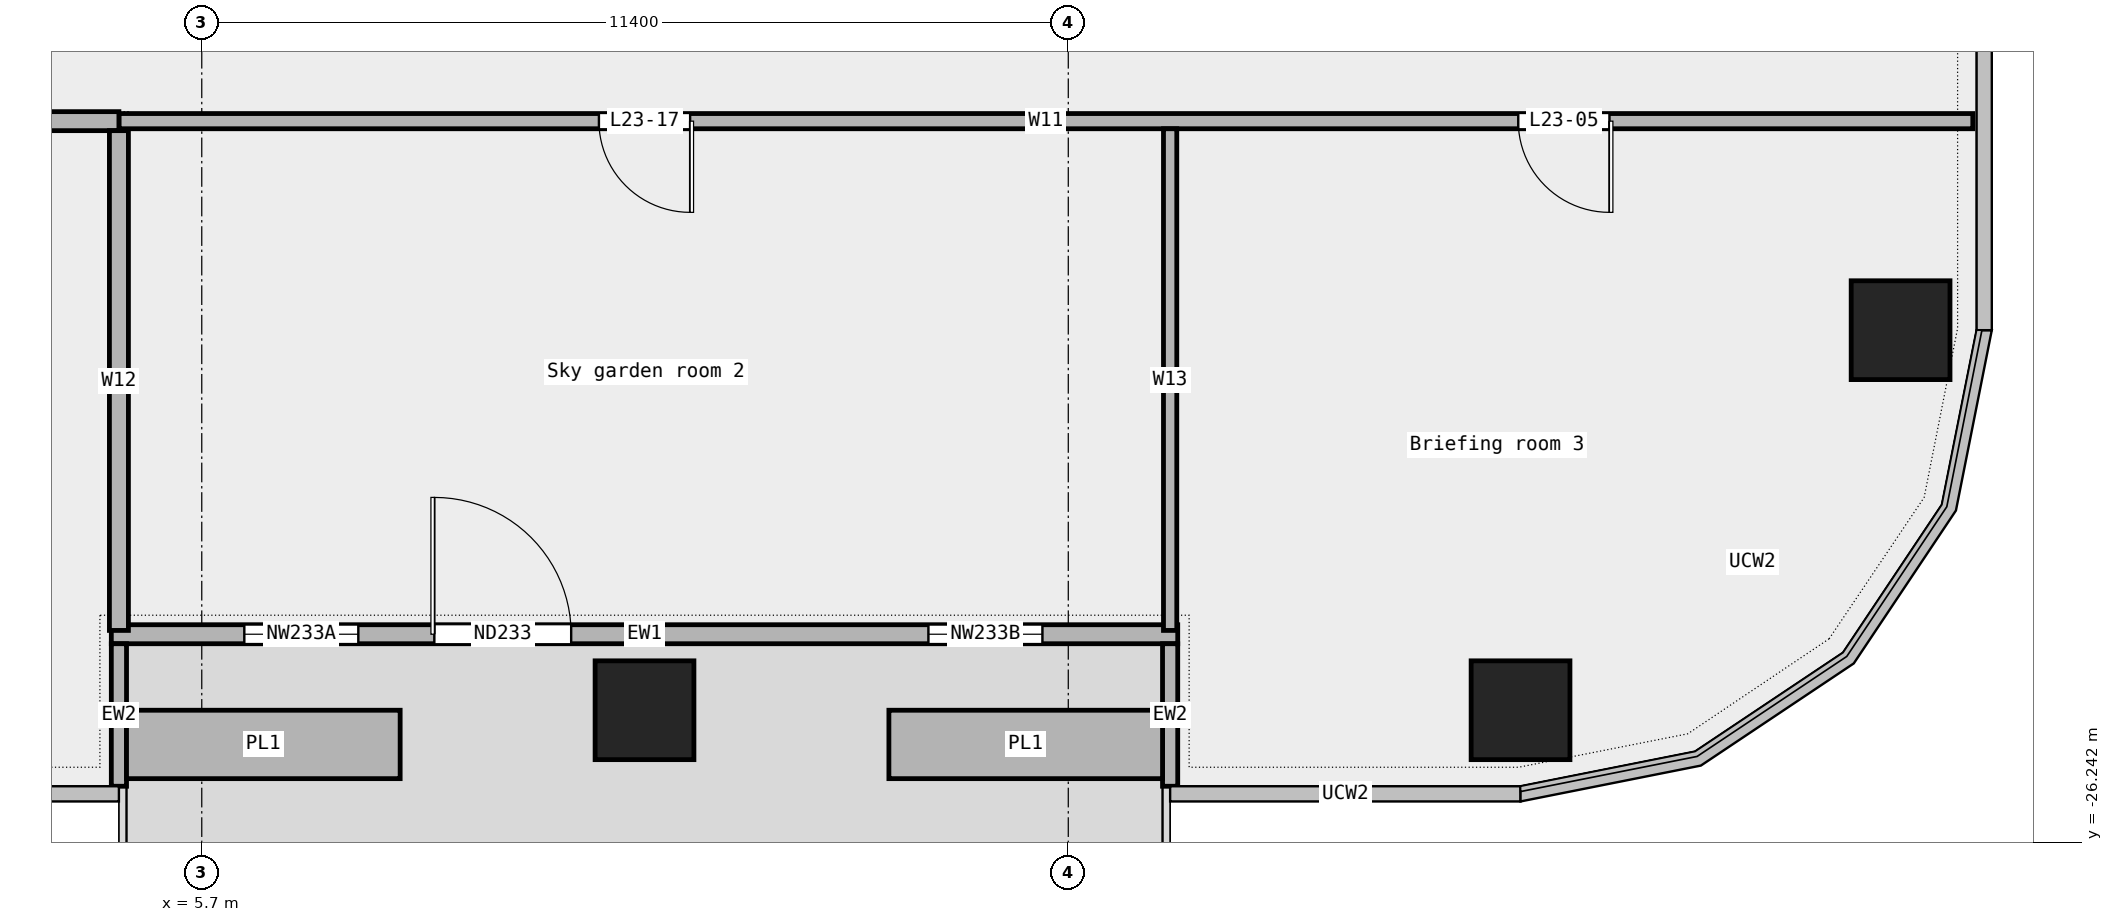
"""IFC4 building model, lengths in metres.
Left out: names, types, materials, properties, quantities, classifications, styles, units other than length and angle.
Written with IfcOpenShell. Run it as: python <this file> out.ifc"""

import sys

from ifc_helpers import new_model, si_unit, direction, frame, frame_2d, origin, origin_2d, place, context, subcontext, project, spatial, rectangle, extrude, element, fill, save


model = new_model("IFC4")
c1 = context("Model", 3, precision=1e-05, world=origin(), true_north=direction((0.0, 1.0)))
c2 = subcontext(c1, "Body", "Model", "MODEL_VIEW")
j1 = project(units=[si_unit("LENGTHUNIT", "METRE"), si_unit("PLANEANGLEUNIT", "RADIAN")], contexts=[c1])
p1 = place(None, origin())
s1 = spatial("IfcSite", under=j1, at=p1, CompositionType="ELEMENT")
p2 = place(p1, origin())
s2 = spatial("IfcBuilding", under=s1, at=p2, CompositionType="ELEMENT")
p3 = place(p2, frame((0.0, 0.0, 117.1)))
s3 = spatial("IfcBuildingStorey", under=s2, at=p3, CompositionType="ELEMENT", Elevation=117.1)
for number, where, z_axis, x_axis in (
    (1, (11.525, -24.5, 0.0), (0.0, 0.0, 1.0), (1.0, 0.0, 0.0)),
    (2, (23.05, -24.5, 0.0), (0.0, 0.0, 1.0), (1.0, 0.0, 0.0)),
    (3, (28.05, -19.5, 0.0), (0.0, 0.0, 1.0), (1.0, 0.0, 0.0)),
):
    element("IfcColumn", number, at=place(p3, frame(where, z_axis=z_axis, x_axis=x_axis)), inside=s3, PredefinedType="COLUMN", context=c2, shape_type="SweptSolid", body=[
        extrude(rectangle(XDim=1.3, YDim=1.3, at=origin_2d()), origin(), (0.0, 0.0, 1.0), 4.05),
    ])
p4 = place(p3, frame((4.51, -23.5, 0.0), z_axis=(0.0, 0.0, 1.0), x_axis=(1.0, 0.0, 0.0)))
e4 = element("IfcWall", 4, at=p4, inside=s3, PredefinedType="STANDARD", context=c2, shape_type="SweptSolid", body=[
    extrude(rectangle(XDim=14.03, YDim=0.25, at=frame_2d((7.015, 0.0))), origin(), (0.0, 0.0, 1.0), 4.05),
])
p5 = place(p4, frame((1.75, 0.0, 0.45)))
e5 = element("IfcOpeningElement", 5, at=p5, cuts=e4, PredefinedType="OPENING", context=c2, shape_type="SweptSolid", body=[
    extrude(rectangle(XDim=1.5, YDim=3.0, at=frame_2d((0.75, 1.5))), frame((0.0, 0.137, 0.0), z_axis=(0.0, -1.0, 0.0), x_axis=(1.0, 0.0, 0.0)), (0.0, 0.0, 1.0), 0.274),
])
p6 = place(p4, frame((4.25, 0.0, 0.0)))
e6 = element("IfcOpeningElement", 6, at=p6, cuts=e4, PredefinedType="OPENING", context=c2, shape_type="SweptSolid", body=[
    extrude(rectangle(XDim=1.8, YDim=2.4, at=frame_2d((0.9, 1.2))), frame((0.0, 0.137, 0.0), z_axis=(0.0, -1.0, 0.0), x_axis=(1.0, 0.0, 0.0)), (0.0, 0.0, 1.0), 0.274),
])
p7 = place(p4, frame((10.75, 0.0, 0.45)))
e7 = element("IfcOpeningElement", 7, at=p7, cuts=e4, PredefinedType="OPENING", context=c2, shape_type="SweptSolid", body=[
    extrude(rectangle(XDim=1.5, YDim=3.0, at=frame_2d((0.75, 1.5))), frame((0.0, 0.137, 0.0), z_axis=(0.0, -1.0, 0.0), x_axis=(1.0, 0.0, 0.0)), (0.0, 0.0, 1.0), 0.274),
])
for number, where, z_axis, x_axis in (
    (8, (4.61, -25.5, 0.0), (0.0, 0.0, 1.0), (0.0, 1.0, 0.0)),
    (9, (18.44, -25.5, 0.0), (0.0, 0.0, 1.0), (0.0, 1.0, 0.0)),
):
    element("IfcWall", number, at=place(p3, frame(where, z_axis=z_axis, x_axis=x_axis)), inside=s3, PredefinedType="STANDARD", context=c2, shape_type="SweptSolid", body=[
        extrude(rectangle(XDim=1.875, YDim=0.2, at=frame_2d((0.938, 0.0))), origin(), (0.0, 0.0, 1.0), 4.05),
    ])
for number, where, z_axis, x_axis in (
    (10, (4.71, -24.95, 0.0), (0.0, 0.0, 1.0), (1.0, 0.0, 0.0)),
    (11, (14.74, -24.95, 0.0), (0.0, 0.0, 1.0), (1.0, 0.0, 0.0)),
):
    element("IfcWall", number, at=place(p3, frame(where, z_axis=z_axis, x_axis=x_axis)), inside=s3, PredefinedType="STANDARD", context=c2, shape_type="SweptSolid", body=[
        extrude(rectangle(XDim=3.6, YDim=0.9, at=frame_2d((1.8, 0.0))), origin(), (0.0, 0.0, 1.0), 0.7),
    ])
p8 = place(p3, frame((4.61, -16.75, 0.0), z_axis=(0.0, 0.0, 1.0), x_axis=(1.0, 0.0, 0.0)))
e12 = element("IfcWall", 12, at=p8, inside=s3, PredefinedType="PARTITIONING", context=c2, shape_type="SweptSolid", body=[
    extrude(rectangle(XDim=24.39, YDim=0.2, at=frame_2d((12.195, 0.0))), origin(), (0.0, 0.0, 1.0), 4.05),
])
p9 = place(p8, frame((18.41, 0.0, 0.0)))
e13 = element("IfcOpeningElement", 13, at=p9, cuts=e12, PredefinedType="OPENING", context=c2, shape_type="SweptSolid", body=[
    extrude(rectangle(XDim=1.2, YDim=2.1, at=frame_2d((0.6, 1.05))), frame((0.0, 0.112, 0.0), z_axis=(0.0, -1.0, 0.0), x_axis=(1.0, 0.0, 0.0)), (0.0, 0.0, 1.0), 0.224),
])
p10 = place(p8, frame((6.315, 0.0, 0.0)))
e14 = element("IfcOpeningElement", 14, at=p10, cuts=e12, PredefinedType="OPENING", context=c2, shape_type="SweptSolid", body=[
    extrude(rectangle(XDim=1.2, YDim=2.1, at=frame_2d((0.6, 1.05))), frame((0.0, 0.112, 0.0), z_axis=(0.0, -1.0, 0.0), x_axis=(1.0, 0.0, 0.0)), (0.0, 0.0, 1.0), 0.224),
])
p11 = place(p3, frame((-4.115, -16.75, 0.0), z_axis=(0.0, 0.0, 1.0), x_axis=(1.0, 0.0, 0.0)))
e15 = element("IfcWall", 15, at=p11, inside=s3, PredefinedType="PARTITIONING", context=c2, shape_type="SweptSolid", body=[
    extrude(rectangle(XDim=8.725, YDim=0.25, at=frame_2d((4.363, 0.0))), origin(), (0.0, 0.0, 1.0), 4.05),
])
p12 = place(p11, frame((3.462, 0.0, 0.0)))
e16 = element("IfcOpeningElement", 16, at=p12, cuts=e15, PredefinedType="OPENING", context=c2, shape_type="SweptSolid", body=[
    extrude(rectangle(XDim=1.8, YDim=2.1, at=frame_2d((0.9, 1.05))), frame((0.0, 0.137, 0.0), z_axis=(0.0, -1.0, 0.0), x_axis=(1.0, 0.0, 0.0)), (0.0, 0.0, 1.0), 0.274),
])
p13 = place(p3, frame((4.61, -23.45, 0.0), z_axis=(0.0, 0.0, 1.0), x_axis=(0.0, 1.0, 0.0)))
e17 = element("IfcWall", 17, at=p13, inside=s3, PredefinedType="PARTITIONING", context=c2, shape_type="SweptSolid", body=[
    extrude(rectangle(XDim=6.575, YDim=0.25, at=frame_2d((3.288, 0.0))), origin(), (0.0, 0.0, 1.0), 4.05),
])
p14 = place(p3, frame((18.44, -23.45, 0.0), z_axis=(0.0, 0.0, 1.0), x_axis=(0.0, 1.0, 0.0)))
e18 = element("IfcWall", 18, at=p14, inside=s3, PredefinedType="PARTITIONING", context=c2, shape_type="SweptSolid", body=[
    extrude(rectangle(XDim=6.6, YDim=0.175, at=frame_2d((3.3, 0.0))), origin(), (0.0, 0.0, 1.0), 4.05),
])
p15 = place(p5, origin())
e19 = element("IfcWindow", 19, at=p15, inside=s3, PartitioningType="SINGLE_PANEL", PredefinedType="WINDOW", context=c2, shape_type="SweptSolid", body=[
    extrude(rectangle(XDim=1.5, YDim=3.0, at=frame_2d((0.75, 1.5))), frame((0.0, 0.03, 0.0), z_axis=(0.0, -1.0, 0.0), x_axis=(1.0, 0.0, 0.0)), (0.0, 0.0, 1.0), 0.06),
])
fill(e5, e19)
p16 = place(p6, origin())
e20 = element("IfcDoor", 20, at=p16, inside=s3, OperationType="DOUBLE_DOOR_SINGLE_SWING", PredefinedType="DOOR", context=c2, shape_type="SweptSolid", body=[
    extrude(rectangle(XDim=1.8, YDim=2.4, at=frame_2d((0.9, 1.2))), frame((0.0, 0.025, 0.0), z_axis=(0.0, -1.0, 0.0), x_axis=(1.0, 0.0, 0.0)), (0.0, 0.0, 1.0), 0.05),
])
fill(e6, e20)
p17 = place(p7, origin())
e21 = element("IfcWindow", 21, at=p17, inside=s3, PartitioningType="SINGLE_PANEL", PredefinedType="WINDOW", context=c2, shape_type="SweptSolid", body=[
    extrude(rectangle(XDim=1.5, YDim=3.0, at=frame_2d((0.75, 1.5))), frame((0.0, 0.03, 0.0), z_axis=(0.0, -1.0, 0.0), x_axis=(1.0, 0.0, 0.0)), (0.0, 0.0, 1.0), 0.06),
])
fill(e7, e21)
p18 = place(p9, origin())
e22 = element("IfcDoor", 22, at=p18, inside=s3, OperationType="SINGLE_SWING_LEFT", PredefinedType="DOOR", context=c2, shape_type="SweptSolid", body=[
    extrude(rectangle(XDim=1.2, YDim=2.1, at=frame_2d((0.6, 1.05))), frame((0.0, 0.025, 0.0), z_axis=(0.0, -1.0, 0.0), x_axis=(1.0, 0.0, 0.0)), (0.0, 0.0, 1.0), 0.05),
])
fill(e13, e22)
p19 = place(p10, origin())
e23 = element("IfcDoor", 23, at=p19, inside=s3, OperationType="SINGLE_SWING_LEFT", PredefinedType="DOOR", context=c2, shape_type="SweptSolid", body=[
    extrude(rectangle(XDim=1.2, YDim=2.1, at=frame_2d((0.6, 1.05))), frame((0.0, 0.025, 0.0), z_axis=(0.0, -1.0, 0.0), x_axis=(1.0, 0.0, 0.0)), (0.0, 0.0, 1.0), 0.05),
])
fill(e14, e23)
save(model, sys.argv[1])
